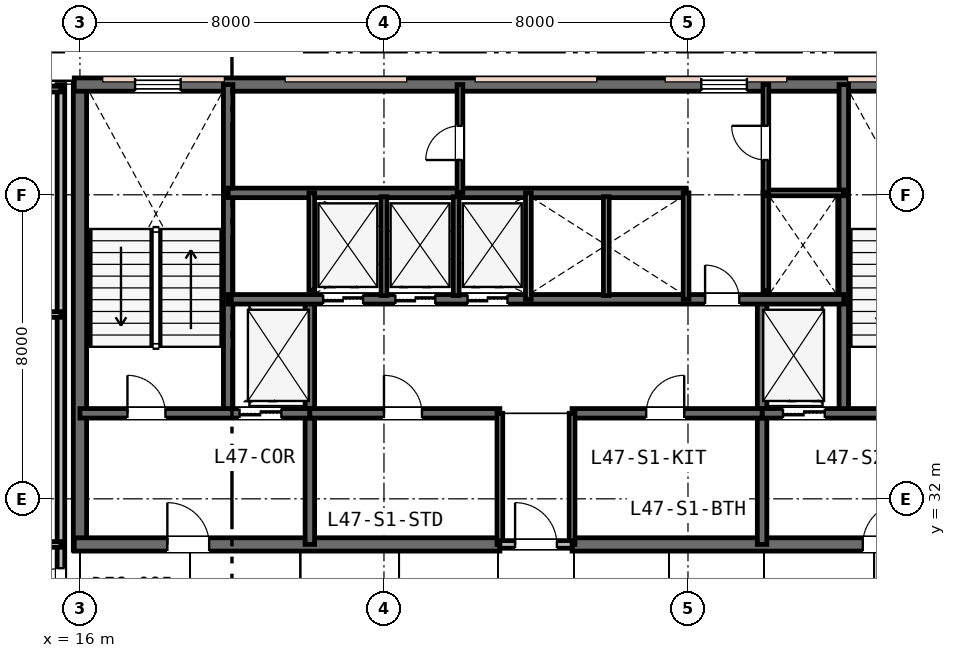
"""IFC4 building model, lengths in metres.
Left out: names, types, materials, properties, quantities, classifications, styles, units other than length and angle.
Written with IfcOpenShell. Run it as: python <this file> out.ifc"""

import sys

from ifc_helpers import new_model, si_unit, direction, frame, frame_2d, origin, place, context, subcontext, project, spatial, rectangle, extrude, element, fill, save


model = new_model("IFC4")
c1 = context("Model", 3, precision=1e-05, world=origin(), true_north=direction((0.0, 1.0)))
c2 = subcontext(c1, "Body", "Model", "MODEL_VIEW")
j1 = project(units=[si_unit("LENGTHUNIT", "METRE"), si_unit("PLANEANGLEUNIT", "RADIAN")], contexts=[c1])
p1 = place(None, origin())
s1 = spatial("IfcSite", under=j1, at=p1, CompositionType="ELEMENT")
p2 = place(p1, origin())
s2 = spatial("IfcBuilding", under=s1, at=p2, CompositionType="ELEMENT")
p3 = place(p2, frame((0.0, 0.0, 183.0)))
s3 = spatial("IfcBuildingStorey", under=s2, at=p3, CompositionType="ELEMENT", Elevation=183.0)
p4 = place(p3, frame((16.0, 30.65, 0.0), z_axis=(0.0, 0.0, 1.0), x_axis=(0.0, 1.0, 0.0)))
e1 = element("IfcWall", 1, at=p4, inside=s3, PredefinedType="SHEAR", context=c2, shape_type="SweptSolid", body=[
    extrude(rectangle(XDim=12.3, YDim=0.35, at=frame_2d((6.15, 0.0))), origin(), (0.0, 0.0, 1.0), 3.6),
])
p5 = place(p3, frame((15.85, 42.9, 0.0), z_axis=(0.0, 0.0, 1.0), x_axis=(1.0, 0.0, 0.0)))
e2 = element("IfcWall", 2, at=p5, inside=s3, PredefinedType="SHEAR", context=c2, shape_type="SweptSolid", body=[
    extrude(rectangle(XDim=24.3, YDim=0.35, at=frame_2d((12.15, 0.0))), origin(), (0.0, 0.0, 1.0), 3.6),
])
p6 = place(p5, frame((1.6, 0.0, 0.95)))
e3 = element("IfcOpeningElement", 3, at=p6, cuts=e2, PredefinedType="OPENING", context=c2, shape_type="SweptSolid", body=[
    extrude(rectangle(XDim=1.2, YDim=1.6, at=frame_2d((0.6, 0.8))), frame((0.0, 0.185, 0.0), z_axis=(0.0, -1.0, 0.0), x_axis=(1.0, 0.0, 0.0)), (0.0, 0.0, 1.0), 0.37),
])
p7 = place(p5, frame((16.5, 0.0, 0.95)))
e4 = element("IfcOpeningElement", 4, at=p7, cuts=e2, PredefinedType="OPENING", context=c2, shape_type="SweptSolid", body=[
    extrude(rectangle(XDim=1.2, YDim=1.6, at=frame_2d((0.6, 0.8))), frame((0.0, 0.185, 0.0), z_axis=(0.0, -1.0, 0.0), x_axis=(1.0, 0.0, 0.0)), (0.0, 0.0, 1.0), 0.37),
])
p8 = place(p5, frame((21.6, 0.0, 0.95)))
e5 = element("IfcOpeningElement", 5, at=p8, cuts=e2, PredefinedType="OPENING", context=c2, shape_type="SweptSolid", body=[
    extrude(rectangle(XDim=1.2, YDim=1.6, at=frame_2d((0.6, 0.8))), frame((0.0, 0.185, 0.0), z_axis=(0.0, -1.0, 0.0), x_axis=(1.0, 0.0, 0.0)), (0.0, 0.0, 1.0), 0.37),
])
p9 = place(p3, frame((15.85, 30.8, 0.0), z_axis=(0.0, 0.0, 1.0), x_axis=(1.0, 0.0, 0.0)))
e6 = element("IfcWall", 6, at=p9, inside=s3, PredefinedType="SHEAR", context=c2, shape_type="SweptSolid", body=[
    extrude(rectangle(XDim=11.2, YDim=0.35, at=frame_2d((5.6, 0.0))), origin(), (0.0, 0.0, 1.0), 3.6),
])
p10 = place(p9, frame((2.45, 0.0, 0.0)))
e7 = element("IfcOpeningElement", 7, at=p10, cuts=e6, PredefinedType="OPENING", context=c2, shape_type="SweptSolid", body=[
    extrude(rectangle(XDim=1.1, YDim=2.15, at=frame_2d((0.55, 1.075))), frame((0.0, 0.185, 0.0), z_axis=(0.0, -1.0, 0.0), x_axis=(1.0, 0.0, 0.0)), (0.0, 0.0, 1.0), 0.37),
])
p11 = place(p3, frame((28.95, 30.8, 0.0), z_axis=(0.0, 0.0, 1.0), x_axis=(1.0, 0.0, 0.0)))
e8 = element("IfcWall", 8, at=p11, inside=s3, PredefinedType="SHEAR", context=c2, shape_type="SweptSolid", body=[
    extrude(rectangle(XDim=11.2, YDim=0.35, at=frame_2d((5.6, 0.0))), origin(), (0.0, 0.0, 1.0), 3.6),
])
p12 = place(p11, frame((7.65, 0.0, 0.0)))
e9 = element("IfcOpeningElement", 9, at=p12, cuts=e8, PredefinedType="OPENING", context=c2, shape_type="SweptSolid", body=[
    extrude(rectangle(XDim=1.1, YDim=2.15, at=frame_2d((0.55, 1.075))), frame((0.0, 0.185, 0.0), z_axis=(0.0, -1.0, 0.0), x_axis=(1.0, 0.0, 0.0)), (0.0, 0.0, 1.0), 0.37),
])
for number, where, z_axis, x_axis in (
    (10, (19.9, 34.25, 0.0), (0.0, 0.0, 1.0), (0.0, 1.0, 0.0)),
    (11, (36.1, 34.25, 0.0), (0.0, 0.0, 1.0), (0.0, 1.0, 0.0)),
):
    element("IfcWall", number, at=place(p3, frame(where, z_axis=z_axis, x_axis=x_axis)), inside=s3, PredefinedType="SHEAR", context=c2, shape_type="SweptSolid", body=[
        extrude(rectangle(XDim=8.65, YDim=0.25, at=frame_2d((4.325, 0.0))), origin(), (0.0, 0.0, 1.0), 3.6),
    ])
for number, where, z_axis, x_axis in (
    (12, (22.05, 30.8, 0.0), (0.0, 0.0, 1.0), (0.0, 1.0, 0.0)),
    (13, (33.95, 30.8, 0.0), (0.0, 0.0, 1.0), (0.0, 1.0, 0.0)),
):
    element("IfcWall", number, at=place(p3, frame(where, z_axis=z_axis, x_axis=x_axis)), inside=s3, PredefinedType="SHEAR", context=c2, shape_type="SweptSolid", body=[
        extrude(rectangle(XDim=6.45, YDim=0.25, at=frame_2d((3.225, 0.0))), origin(), (0.0, 0.0, 1.0), 3.6),
    ])
p13 = place(p3, frame((16.0, 34.25, 0.0), z_axis=(0.0, 0.0, 1.0), x_axis=(1.0, 0.0, 0.0)))
e14 = element("IfcWall", 14, at=p13, inside=s3, PredefinedType="SHEAR", context=c2, shape_type="SweptSolid", body=[
    extrude(rectangle(XDim=6.05, YDim=0.25, at=frame_2d((3.025, 0.0))), origin(), (0.0, 0.0, 1.0), 3.6),
])
p14 = place(p13, frame((1.25, 0.0, 0.0)))
e15 = element("IfcOpeningElement", 15, at=p14, cuts=e14, PredefinedType="OPENING", context=c2, shape_type="SweptSolid", body=[
    extrude(rectangle(XDim=1.0, YDim=2.15, at=frame_2d((0.5, 1.075))), frame((0.0, 0.135, 0.0), z_axis=(0.0, -1.0, 0.0), x_axis=(1.0, 0.0, 0.0)), (0.0, 0.0, 1.0), 0.27),
])
p15 = place(p13, frame((4.2, 0.0, 0.0)))
e16 = element("IfcOpeningElement", 16, at=p15, cuts=e14, PredefinedType="OPENING", context=c2, shape_type="SweptSolid", body=[
    extrude(rectangle(XDim=1.1, YDim=2.15, at=frame_2d((0.55, 1.075))), frame((0.0, 0.135, 0.0), z_axis=(0.0, -1.0, 0.0), x_axis=(1.0, 0.0, 0.0)), (0.0, 0.0, 1.0), 0.27),
])
p16 = place(p3, frame((33.95, 34.25, 0.0), z_axis=(0.0, 0.0, 1.0), x_axis=(1.0, 0.0, 0.0)))
e17 = element("IfcWall", 17, at=p16, inside=s3, PredefinedType="SHEAR", context=c2, shape_type="SweptSolid", body=[
    extrude(rectangle(XDim=6.05, YDim=0.25, at=frame_2d((3.025, 0.0))), origin(), (0.0, 0.0, 1.0), 3.6),
])
p17 = place(p16, frame((3.7, 0.0, 0.0)))
e18 = element("IfcOpeningElement", 18, at=p17, cuts=e17, PredefinedType="OPENING", context=c2, shape_type="SweptSolid", body=[
    extrude(rectangle(XDim=1.0, YDim=2.15, at=frame_2d((0.5, 1.075))), frame((0.0, 0.135, 0.0), z_axis=(0.0, -1.0, 0.0), x_axis=(1.0, 0.0, 0.0)), (0.0, 0.0, 1.0), 0.27),
])
p18 = place(p16, frame((0.55, 0.0, 0.0)))
e19 = element("IfcOpeningElement", 19, at=p18, cuts=e17, PredefinedType="OPENING", context=c2, shape_type="SweptSolid", body=[
    extrude(rectangle(XDim=1.1, YDim=2.15, at=frame_2d((0.55, 1.075))), frame((0.0, 0.135, 0.0), z_axis=(0.0, -1.0, 0.0), x_axis=(1.0, 0.0, 0.0)), (0.0, 0.0, 1.0), 0.27),
])
p19 = place(p3, frame((22.05, 34.25, 0.0), z_axis=(0.0, 0.0, 1.0), x_axis=(1.0, 0.0, 0.0)))
e20 = element("IfcWall", 20, at=p19, inside=s3, PredefinedType="SHEAR", context=c2, shape_type="SweptSolid", body=[
    extrude(rectangle(XDim=5.0, YDim=0.25, at=frame_2d((2.5, 0.0))), origin(), (0.0, 0.0, 1.0), 3.6),
])
p20 = place(p19, frame((1.95, 0.0, 0.0)))
e21 = element("IfcOpeningElement", 21, at=p20, cuts=e20, PredefinedType="OPENING", context=c2, shape_type="SweptSolid", body=[
    extrude(rectangle(XDim=1.0, YDim=2.15, at=frame_2d((0.5, 1.075))), frame((0.0, 0.135, 0.0), z_axis=(0.0, -1.0, 0.0), x_axis=(1.0, 0.0, 0.0)), (0.0, 0.0, 1.0), 0.27),
])
p21 = place(p3, frame((28.95, 34.25, 0.0), z_axis=(0.0, 0.0, 1.0), x_axis=(1.0, 0.0, 0.0)))
e22 = element("IfcWall", 22, at=p21, inside=s3, PredefinedType="SHEAR", context=c2, shape_type="SweptSolid", body=[
    extrude(rectangle(XDim=5.0, YDim=0.25, at=frame_2d((2.5, 0.0))), origin(), (0.0, 0.0, 1.0), 3.6),
])
p22 = place(p21, frame((1.95, 0.0, 0.0)))
e23 = element("IfcOpeningElement", 23, at=p22, cuts=e22, PredefinedType="OPENING", context=c2, shape_type="SweptSolid", body=[
    extrude(rectangle(XDim=1.0, YDim=2.15, at=frame_2d((0.5, 1.075))), frame((0.0, 0.135, 0.0), z_axis=(0.0, -1.0, 0.0), x_axis=(1.0, 0.0, 0.0)), (0.0, 0.0, 1.0), 0.27),
])
p23 = place(p3, frame((19.9, 37.25, 0.0), z_axis=(0.0, 0.0, 1.0), x_axis=(1.0, 0.0, 0.0)))
e24 = element("IfcWall", 24, at=p23, inside=s3, PredefinedType="SHEAR", context=c2, shape_type="SweptSolid", body=[
    extrude(rectangle(XDim=16.2, YDim=0.25, at=frame_2d((8.1, 0.0))), origin(), (0.0, 0.0, 1.0), 3.6),
])
p24 = place(p23, frame((12.55, 0.0, 0.0)))
e25 = element("IfcOpeningElement", 25, at=p24, cuts=e24, PredefinedType="OPENING", context=c2, shape_type="SweptSolid", body=[
    extrude(rectangle(XDim=0.9, YDim=2.15, at=frame_2d((0.45, 1.075))), frame((0.0, 0.135, 0.0), z_axis=(0.0, -1.0, 0.0), x_axis=(1.0, 0.0, 0.0)), (0.0, 0.0, 1.0), 0.27),
])
p25 = place(p23, frame((2.5, 0.0, 0.0)))
e26 = element("IfcOpeningElement", 26, at=p25, cuts=e24, PredefinedType="OPENING", context=c2, shape_type="SweptSolid", body=[
    extrude(rectangle(XDim=1.05, YDim=2.15, at=frame_2d((0.525, 1.075))), frame((0.0, 0.135, 0.0), z_axis=(0.0, -1.0, 0.0), x_axis=(1.0, 0.0, 0.0)), (0.0, 0.0, 1.0), 0.27),
])
p26 = place(p23, frame((4.4, 0.0, 0.0)))
e27 = element("IfcOpeningElement", 27, at=p26, cuts=e24, PredefinedType="OPENING", context=c2, shape_type="SweptSolid", body=[
    extrude(rectangle(XDim=1.05, YDim=2.15, at=frame_2d((0.525, 1.075))), frame((0.0, 0.135, 0.0), z_axis=(0.0, -1.0, 0.0), x_axis=(1.0, 0.0, 0.0)), (0.0, 0.0, 1.0), 0.27),
])
p27 = place(p23, frame((6.3, 0.0, 0.0)))
e28 = element("IfcOpeningElement", 28, at=p27, cuts=e24, PredefinedType="OPENING", context=c2, shape_type="SweptSolid", body=[
    extrude(rectangle(XDim=1.05, YDim=2.15, at=frame_2d((0.525, 1.075))), frame((0.0, 0.135, 0.0), z_axis=(0.0, -1.0, 0.0), x_axis=(1.0, 0.0, 0.0)), (0.0, 0.0, 1.0), 0.27),
])
p28 = place(p3, frame((19.9, 40.05, 0.0), z_axis=(0.0, 0.0, 1.0), x_axis=(1.0, 0.0, 0.0)))
e29 = element("IfcWall", 29, at=p28, inside=s3, PredefinedType="SHEAR", context=c2, shape_type="SweptSolid", body=[
    extrude(rectangle(XDim=12.05, YDim=0.25, at=frame_2d((6.025, 0.0))), origin(), (0.0, 0.0, 1.0), 3.6),
])
for number, where, z_axis, x_axis in (
    (30, (27.05, 30.8, 0.0), (0.0, 0.0, 1.0), (0.0, 1.0, 0.0)),
    (31, (28.95, 30.8, 0.0), (0.0, 0.0, 1.0), (0.0, 1.0, 0.0)),
):
    element("IfcWall", number, at=place(p3, frame(where, z_axis=z_axis, x_axis=x_axis)), inside=s3, PredefinedType="PLUMBINGWALL", context=c2, shape_type="SweptSolid", body=[
        extrude(rectangle(XDim=3.45, YDim=0.15, at=frame_2d((1.725, 0.0))), origin(), (0.0, 0.0, 1.0), 3.07),
    ])
p29 = place(p3, frame((27.05, 30.8, 0.0), z_axis=(0.0, 0.0, 1.0), x_axis=(1.0, 0.0, 0.0)))
e32 = element("IfcWall", 32, at=p29, inside=s3, PredefinedType="PARTITIONING", context=c2, shape_type="SweptSolid", body=[
    extrude(rectangle(XDim=1.9, YDim=0.2, at=frame_2d((0.95, 0.0))), origin(), (0.0, 0.0, 1.0), 3.07),
])
p30 = place(p29, frame((0.4, 0.0, 0.0)))
e33 = element("IfcOpeningElement", 33, at=p30, cuts=e32, PredefinedType="OPENING", context=c2, shape_type="SweptSolid", body=[
    extrude(rectangle(XDim=1.1, YDim=2.15, at=frame_2d((0.55, 1.075))), frame((0.0, 0.11, 0.0), z_axis=(0.0, -1.0, 0.0), x_axis=(1.0, 0.0, 0.0)), (0.0, 0.0, 1.0), 0.22),
])
p31 = place(p3, frame((22.1, 37.49, 0.0), z_axis=(0.0, 0.0, 1.0), x_axis=(0.0, 1.0, 0.0)))
e34 = element("IfcWall", 34, at=p31, inside=s3, PredefinedType="PLUMBINGWALL", context=c2, shape_type="SweptSolid", body=[
    extrude(rectangle(XDim=2.56, YDim=0.15, at=frame_2d((1.28, 0.0))), origin(), (0.0, 0.0, 1.0), 3.33),
])
p32 = place(p3, frame((27.8, 37.25, 0.0), z_axis=(0.0, 0.0, 1.0), x_axis=(0.0, 1.0, 0.0)))
e35 = element("IfcWall", 35, at=p32, inside=s3, PredefinedType="PLUMBINGWALL", context=c2, shape_type="SweptSolid", body=[
    extrude(rectangle(XDim=2.8, YDim=0.15, at=frame_2d((1.4, 0.0))), origin(), (0.0, 0.0, 1.0), 3.33),
])
for number, where, z_axis, x_axis in (
    (36, (24.0, 37.35, 0.0), (0.0, 0.0, 1.0), (0.0, 1.0, 0.0)),
    (37, (25.9, 37.35, 0.0), (0.0, 0.0, 1.0), (0.0, 1.0, 0.0)),
):
    element("IfcWall", number, at=place(p3, frame(where, z_axis=z_axis, x_axis=x_axis)), inside=s3, PredefinedType="PLUMBINGWALL", context=c2, shape_type="SweptSolid", body=[
        extrude(rectangle(XDim=2.6, YDim=0.15, at=frame_2d((1.3, 0.0))), origin(), (0.0, 0.0, 1.0), 3.33),
    ])
p33 = place(p3, frame((31.95, 37.25, 0.0), z_axis=(0.0, 0.0, 1.0), x_axis=(0.0, 1.0, 0.0)))
e38 = element("IfcWall", 38, at=p33, inside=s3, PredefinedType="PLUMBINGWALL", context=c2, shape_type="SweptSolid", body=[
    extrude(rectangle(XDim=2.8, YDim=0.15, at=frame_2d((1.4, 0.0))), origin(), (0.0, 0.0, 1.0), 3.33),
])
p34 = place(p3, frame((29.85, 37.35, 0.0), z_axis=(0.0, 0.0, 1.0), x_axis=(0.0, 1.0, 0.0)))
e39 = element("IfcWall", 39, at=p34, inside=s3, PredefinedType="PLUMBINGWALL", context=c2, shape_type="SweptSolid", body=[
    extrude(rectangle(XDim=2.6, YDim=0.15, at=frame_2d((1.3, 0.0))), origin(), (0.0, 0.0, 1.0), 3.33),
])
p35 = place(p3, frame((34.05, 37.473, 0.0), z_axis=(0.0, 0.0, 1.0), x_axis=(0.0, 1.0, 0.0)))
e40 = element("IfcWall", 40, at=p35, inside=s3, PredefinedType="PLUMBINGWALL", context=c2, shape_type="SweptSolid", body=[
    extrude(rectangle(XDim=2.577, YDim=0.15, at=frame_2d((1.288, 0.0))), origin(), (0.0, 0.0, 1.0), 3.33),
])
p36 = place(p3, frame((34.05, 40.05, 0.0), z_axis=(0.0, 0.0, 1.0), x_axis=(1.0, 0.0, 0.0)))
e41 = element("IfcWall", 41, at=p36, inside=s3, PredefinedType="PARTITIONING", context=c2, shape_type="SweptSolid", body=[
    extrude(rectangle(XDim=2.05, YDim=0.15, at=frame_2d((1.025, 0.0))), origin(), (0.0, 0.0, 1.0), 3.33),
])
p37 = place(p3, frame((34.05, 40.05, 0.0), z_axis=(0.0, 0.0, 1.0), x_axis=(0.0, 1.0, 0.0)))
e42 = element("IfcWall", 42, at=p37, inside=s3, PredefinedType="PARTITIONING", context=c2, shape_type="SweptSolid", body=[
    extrude(rectangle(XDim=2.85, YDim=0.15, at=frame_2d((1.425, 0.0))), origin(), (0.0, 0.0, 1.0), 3.33),
])
p38 = place(p37, frame((0.865, 0.0, 0.0)))
e43 = element("IfcOpeningElement", 43, at=p38, cuts=e42, PredefinedType="OPENING", context=c2, shape_type="SweptSolid", body=[
    extrude(rectangle(XDim=0.9, YDim=2.15, at=frame_2d((0.45, 1.075))), frame((0.0, 0.085, 0.0), z_axis=(0.0, -1.0, 0.0), x_axis=(1.0, 0.0, 0.0)), (0.0, 0.0, 1.0), 0.17),
])
p39 = place(p3, frame((26.0, 40.05, 0.0), z_axis=(0.0, 0.0, 1.0), x_axis=(0.0, 1.0, 0.0)))
e44 = element("IfcWall", 44, at=p39, inside=s3, PredefinedType="PARTITIONING", context=c2, shape_type="SweptSolid", body=[
    extrude(rectangle(XDim=2.85, YDim=0.15, at=frame_2d((1.425, 0.0))), origin(), (0.0, 0.0, 1.0), 3.33),
])
p40 = place(p39, frame((0.865, 0.0, 0.0)))
e45 = element("IfcOpeningElement", 45, at=p40, cuts=e44, PredefinedType="OPENING", context=c2, shape_type="SweptSolid", body=[
    extrude(rectangle(XDim=0.9, YDim=2.15, at=frame_2d((0.45, 1.075))), frame((0.0, 0.085, 0.0), z_axis=(0.0, -1.0, 0.0), x_axis=(1.0, 0.0, 0.0)), (0.0, 0.0, 1.0), 0.17),
])
p41 = place(p3, frame((15.5, 28.6, 0.0), z_axis=(0.0, 0.0, 1.0), x_axis=(0.0, 1.0, 0.0)))
e46 = element("IfcWall", 46, at=p41, inside=s3, PredefinedType="PARTITIONING", context=c2, shape_type="SweptSolid", body=[
    extrude(rectangle(XDim=14.3, YDim=0.2, at=frame_2d((7.15, 0.0))), origin(), (0.0, 0.0, 1.0), 2.92),
])
p42 = place(p41, frame((0.625, 0.0, 0.0)))
e47 = element("IfcOpeningElement", 47, at=p42, cuts=e46, PredefinedType="OPENING", context=c2, shape_type="SweptSolid", body=[
    extrude(rectangle(XDim=0.95, YDim=2.15, at=frame_2d((0.475, 1.075))), frame((0.0, 0.11, 0.0), z_axis=(0.0, -1.0, 0.0), x_axis=(1.0, 0.0, 0.0)), (0.0, 0.0, 1.0), 0.22),
])
p43 = place(p3, frame((12.9, 30.8, 0.0), z_axis=(0.0, 0.0, 1.0), x_axis=(1.0, 0.0, 0.0)))
e48 = element("IfcWall", 48, at=p43, inside=s3, PredefinedType="PARTITIONING", context=c2, shape_type="SweptSolid", body=[
    extrude(rectangle(XDim=2.6, YDim=0.15, at=frame_2d((1.3, 0.0))), origin(), (0.0, 0.0, 1.0), 2.92),
])
for number, where, z_axis, x_axis in (
    (49, (12.9, 36.85, 0.0), (0.0, 0.0, 1.0), (1.0, 0.0, 0.0)),
    (50, (12.9, 42.78, 0.0), (0.0, 0.0, 1.0), (1.0, 0.0, 0.0)),
):
    element("IfcWall", number, at=place(p3, frame(where, z_axis=z_axis, x_axis=x_axis)), inside=s3, PredefinedType="PARTITIONING", context=c2, shape_type="SweptSolid", body=[
        extrude(rectangle(XDim=2.6, YDim=0.15, at=frame_2d((1.3, 0.0))), origin(), (0.0, 0.0, 1.0), 3.33),
    ])
p44 = place(p6, origin())
e51 = element("IfcWindow", 51, at=p44, inside=s3, PartitioningType="SINGLE_PANEL", PredefinedType="WINDOW", context=c2, shape_type="SweptSolid", body=[
    extrude(rectangle(XDim=1.2, YDim=1.6, at=frame_2d((0.6, 0.8))), frame((0.0, 0.03, 0.0), z_axis=(0.0, -1.0, 0.0), x_axis=(1.0, 0.0, 0.0)), (0.0, 0.0, 1.0), 0.06),
])
fill(e3, e51)
p45 = place(p7, origin())
e52 = element("IfcWindow", 52, at=p45, inside=s3, PartitioningType="SINGLE_PANEL", PredefinedType="WINDOW", context=c2, shape_type="SweptSolid", body=[
    extrude(rectangle(XDim=1.2, YDim=1.6, at=frame_2d((0.6, 0.8))), frame((0.0, 0.03, 0.0), z_axis=(0.0, -1.0, 0.0), x_axis=(1.0, 0.0, 0.0)), (0.0, 0.0, 1.0), 0.06),
])
fill(e4, e52)
p46 = place(p30, origin())
e53 = element("IfcDoor", 53, at=p46, inside=s3, OperationType="SINGLE_SWING_LEFT", PredefinedType="DOOR", context=c2, shape_type="SweptSolid", body=[
    extrude(rectangle(XDim=1.1, YDim=2.15, at=frame_2d((0.55, 1.075))), frame((0.0, 0.025, 0.0), z_axis=(0.0, -1.0, 0.0), x_axis=(1.0, 0.0, 0.0)), (0.0, 0.0, 1.0), 0.05),
])
fill(e33, e53)
p47 = place(p14, origin())
e54 = element("IfcDoor", 54, at=p47, inside=s3, OperationType="SINGLE_SWING_LEFT", PredefinedType="DOOR", context=c2, shape_type="SweptSolid", body=[
    extrude(rectangle(XDim=1.0, YDim=2.15, at=frame_2d((0.5, 1.075))), frame((0.0, 0.025, 0.0), z_axis=(0.0, -1.0, 0.0), x_axis=(1.0, 0.0, 0.0)), (0.0, 0.0, 1.0), 0.05),
])
fill(e15, e54)
p48 = place(p10, origin())
e55 = element("IfcDoor", 55, at=p48, inside=s3, OperationType="SINGLE_SWING_LEFT", PredefinedType="DOOR", context=c2, shape_type="SweptSolid", body=[
    extrude(rectangle(XDim=1.1, YDim=2.15, at=frame_2d((0.55, 1.075))), frame((0.0, 0.025, 0.0), z_axis=(0.0, -1.0, 0.0), x_axis=(1.0, 0.0, 0.0)), (0.0, 0.0, 1.0), 0.05),
])
fill(e7, e55)
p49 = place(p12, origin())
e56 = element("IfcDoor", 56, at=p49, inside=s3, OperationType="SINGLE_SWING_RIGHT", PredefinedType="DOOR", context=c2, shape_type="SweptSolid", body=[
    extrude(rectangle(XDim=1.1, YDim=2.15, at=frame_2d((0.55, 1.075))), frame((0.0, 0.025, 0.0), z_axis=(0.0, -1.0, 0.0), x_axis=(1.0, 0.0, 0.0)), (0.0, 0.0, 1.0), 0.05),
])
fill(e9, e56)
p50 = place(p20, origin())
e57 = element("IfcDoor", 57, at=p50, inside=s3, OperationType="SINGLE_SWING_LEFT", PredefinedType="DOOR", context=c2, shape_type="SweptSolid", body=[
    extrude(rectangle(XDim=1.0, YDim=2.15, at=frame_2d((0.5, 1.075))), frame((0.0, 0.025, 0.0), z_axis=(0.0, -1.0, 0.0), x_axis=(1.0, 0.0, 0.0)), (0.0, 0.0, 1.0), 0.05),
])
fill(e21, e57)
p51 = place(p22, origin())
e58 = element("IfcDoor", 58, at=p51, inside=s3, OperationType="SINGLE_SWING_RIGHT", PredefinedType="DOOR", context=c2, shape_type="SweptSolid", body=[
    extrude(rectangle(XDim=1.0, YDim=2.15, at=frame_2d((0.5, 1.075))), frame((0.0, 0.025, 0.0), z_axis=(0.0, -1.0, 0.0), x_axis=(1.0, 0.0, 0.0)), (0.0, 0.0, 1.0), 0.05),
])
fill(e23, e58)
p52 = place(p24, origin())
e59 = element("IfcDoor", 59, at=p52, inside=s3, OperationType="SINGLE_SWING_LEFT", PredefinedType="DOOR", context=c2, shape_type="SweptSolid", body=[
    extrude(rectangle(XDim=0.9, YDim=2.15, at=frame_2d((0.45, 1.075))), frame((0.0, 0.025, 0.0), z_axis=(0.0, -1.0, 0.0), x_axis=(1.0, 0.0, 0.0)), (0.0, 0.0, 1.0), 0.05),
])
fill(e25, e59)
p53 = place(p38, origin())
e60 = element("IfcDoor", 60, at=p53, inside=s3, OperationType="SINGLE_SWING_RIGHT", PredefinedType="DOOR", context=c2, shape_type="SweptSolid", body=[
    extrude(rectangle(XDim=0.9, YDim=2.15, at=frame_2d((0.45, 1.075))), frame((0.0, 0.025, 0.0), z_axis=(0.0, -1.0, 0.0), x_axis=(1.0, 0.0, 0.0)), (0.0, 0.0, 1.0), 0.05),
])
fill(e43, e60)
p54 = place(p40, origin())
e61 = element("IfcDoor", 61, at=p54, inside=s3, OperationType="SINGLE_SWING_LEFT", PredefinedType="DOOR", context=c2, shape_type="SweptSolid", body=[
    extrude(rectangle(XDim=0.9, YDim=2.15, at=frame_2d((0.45, 1.075))), frame((0.0, 0.025, 0.0), z_axis=(0.0, -1.0, 0.0), x_axis=(1.0, 0.0, 0.0)), (0.0, 0.0, 1.0), 0.05),
])
fill(e45, e61)
p55 = place(p42, origin())
e62 = element("IfcDoor", 62, at=p55, inside=s3, OperationType="SINGLE_SWING_LEFT", PredefinedType="DOOR", context=c2, shape_type="SweptSolid", body=[
    extrude(rectangle(XDim=0.95, YDim=2.15, at=frame_2d((0.475, 1.075))), frame((0.0, 0.025, 0.0), z_axis=(0.0, -1.0, 0.0), x_axis=(1.0, 0.0, 0.0)), (0.0, 0.0, 1.0), 0.05),
])
fill(e47, e62)
p56 = place(p15, origin())
e63 = element("IfcDoor", 63, at=p56, inside=s3, OperationType="DOUBLE_DOOR_SLIDING", PredefinedType="DOOR", context=c2, shape_type="SweptSolid", body=[
    extrude(rectangle(XDim=1.1, YDim=2.15, at=frame_2d((0.55, 1.075))), frame((0.0, 0.025, 0.0), z_axis=(0.0, -1.0, 0.0), x_axis=(1.0, 0.0, 0.0)), (0.0, 0.0, 1.0), 0.05),
])
fill(e16, e63)
p57 = place(p18, origin())
e64 = element("IfcDoor", 64, at=p57, inside=s3, OperationType="DOUBLE_DOOR_SLIDING", PredefinedType="DOOR", context=c2, shape_type="SweptSolid", body=[
    extrude(rectangle(XDim=1.1, YDim=2.15, at=frame_2d((0.55, 1.075))), frame((0.0, 0.025, 0.0), z_axis=(0.0, -1.0, 0.0), x_axis=(1.0, 0.0, 0.0)), (0.0, 0.0, 1.0), 0.05),
])
fill(e19, e64)
p58 = place(p25, origin())
e65 = element("IfcDoor", 65, at=p58, inside=s3, OperationType="DOUBLE_DOOR_SLIDING", PredefinedType="DOOR", context=c2, shape_type="SweptSolid", body=[
    extrude(rectangle(XDim=1.05, YDim=2.15, at=frame_2d((0.525, 1.075))), frame((0.0, 0.025, 0.0), z_axis=(0.0, -1.0, 0.0), x_axis=(1.0, 0.0, 0.0)), (0.0, 0.0, 1.0), 0.05),
])
fill(e26, e65)
p59 = place(p26, origin())
e66 = element("IfcDoor", 66, at=p59, inside=s3, OperationType="DOUBLE_DOOR_SLIDING", PredefinedType="DOOR", context=c2, shape_type="SweptSolid", body=[
    extrude(rectangle(XDim=1.05, YDim=2.15, at=frame_2d((0.525, 1.075))), frame((0.0, 0.025, 0.0), z_axis=(0.0, -1.0, 0.0), x_axis=(1.0, 0.0, 0.0)), (0.0, 0.0, 1.0), 0.05),
])
fill(e27, e66)
p60 = place(p27, origin())
e67 = element("IfcDoor", 67, at=p60, inside=s3, OperationType="DOUBLE_DOOR_SLIDING", PredefinedType="DOOR", context=c2, shape_type="SweptSolid", body=[
    extrude(rectangle(XDim=1.05, YDim=2.15, at=frame_2d((0.525, 1.075))), frame((0.0, 0.025, 0.0), z_axis=(0.0, -1.0, 0.0), x_axis=(1.0, 0.0, 0.0)), (0.0, 0.0, 1.0), 0.05),
])
fill(e28, e67)
save(model, sys.argv[1])
